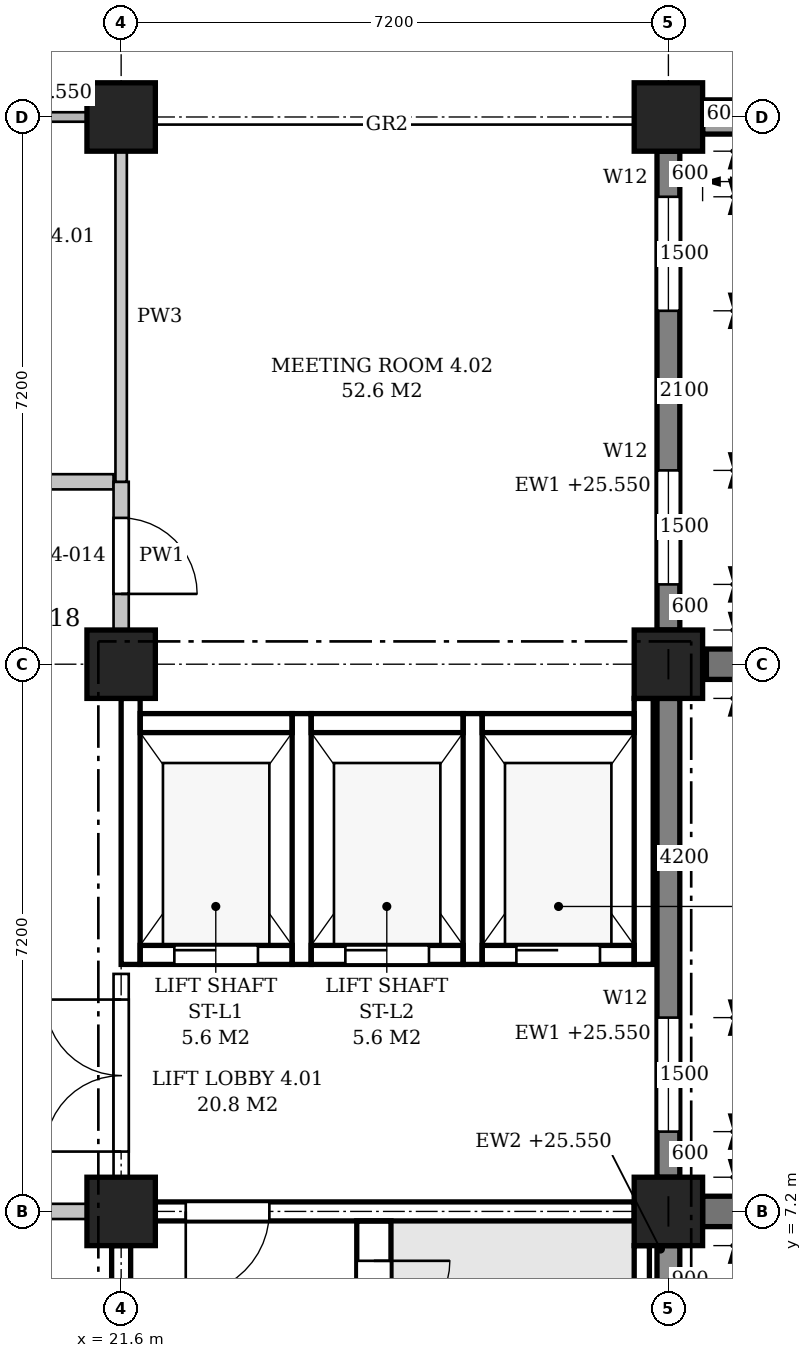
"""IFC4 building model, lengths in metres.
Left out: names, types, materials, properties, quantities, classifications, styles, units other than length and angle.
Written with IfcOpenShell. Run it as: python <this file> out.ifc"""

import sys

from ifc_helpers import new_model, si_unit, direction, frame, frame_2d, origin, origin_2d, place, context, subcontext, project, spatial, polyline, rectangle, outline, extrude, element, fill, save


model = new_model("IFC4")
c1 = context("Model", 3, precision=1e-05, world=origin(), true_north=direction((0.0, 1.0)))
c2 = subcontext(c1, "Body", "Model", "MODEL_VIEW")
j1 = project(units=[si_unit("LENGTHUNIT", "METRE"), si_unit("PLANEANGLEUNIT", "RADIAN")], contexts=[c1])
p1 = place(None, origin())
s1 = spatial("IfcSite", under=j1, at=p1, CompositionType="ELEMENT")
p2 = place(p1, origin())
s2 = spatial("IfcBuilding", under=s1, at=p2, CompositionType="ELEMENT")
p3 = place(p2, frame((0.0, 0.0, 21.6)))
s3 = spatial("IfcBuildingStorey", under=s2, at=p3, CompositionType="ELEMENT", Elevation=21.6)
for number, where, z_axis, x_axis in (
    (1, (21.6, 7.2, 0.0), (0.0, 0.0, 1.0), (1.0, 0.0, 0.0)),
    (2, (21.6, 14.4, 0.0), (0.0, 0.0, 1.0), (1.0, 0.0, 0.0)),
    (3, (21.6, 21.6, 0.0), (0.0, 0.0, 1.0), (1.0, 0.0, 0.0)),
    (4, (28.8, 7.2, 0.0), (0.0, 0.0, 1.0), (1.0, 0.0, 0.0)),
    (5, (28.8, 14.4, 0.0), (0.0, 0.0, 1.0), (1.0, 0.0, 0.0)),
    (6, (28.8, 21.6, 0.0), (0.0, 0.0, 1.0), (1.0, 0.0, 0.0)),
):
    element("IfcColumn", number, at=place(p3, frame(where, z_axis=z_axis, x_axis=x_axis)), inside=s3, PredefinedType="COLUMN", context=c2, shape_type="SweptSolid", body=[
        extrude(rectangle(XDim=0.9, YDim=0.9, at=origin_2d()), origin(), (0.0, 0.0, 1.0), 4.8),
    ])
p4 = place(p3, frame((28.8, 0.45, 0.0), z_axis=(0.0, 0.0, 1.0), x_axis=(0.0, 1.0, 0.0)))
e7 = element("IfcWall", 7, at=p4, inside=s3, PredefinedType="STANDARD", context=c2, shape_type="SweptSolid", body=[
    extrude(rectangle(XDim=6.3, YDim=0.3, at=frame_2d((3.15, 0.0))), origin(), (0.0, 0.0, 1.0), 3.95),
])
p5 = place(p4, frame((0.9, 0.0, 0.9)))
e8 = element("IfcOpeningElement", 8, at=p5, cuts=e7, PredefinedType="OPENING", context=c2, shape_type="SweptSolid", body=[
    extrude(outline(polyline([(0.0, 0.0), (0.9, 0.0), (0.9, 2.05), (0.45, 2.5), (0.0, 2.05), (0.0, 0.0)])), frame((0.0, 0.16, 0.0), z_axis=(0.0, -1.0, 0.0), x_axis=(1.0, 0.0, 0.0)), (0.0, 0.0, 1.0), 0.32),
])
p6 = place(p4, frame((4.5, 0.0, 0.9)))
e9 = element("IfcOpeningElement", 9, at=p6, cuts=e7, PredefinedType="OPENING", context=c2, shape_type="SweptSolid", body=[
    extrude(outline(polyline([(0.0, 0.0), (0.9, 0.0), (0.9, 2.05), (0.45, 2.5), (0.0, 2.05), (0.0, 0.0)])), frame((0.0, 0.16, 0.0), z_axis=(0.0, -1.0, 0.0), x_axis=(1.0, 0.0, 0.0)), (0.0, 0.0, 1.0), 0.32),
])
p7 = place(p3, frame((28.8, 7.65, 0.0), z_axis=(0.0, 0.0, 1.0), x_axis=(0.0, 1.0, 0.0)))
e10 = element("IfcWall", 10, at=p7, inside=s3, PredefinedType="STANDARD", context=c2, shape_type="SweptSolid", body=[
    extrude(rectangle(XDim=6.3, YDim=0.3, at=frame_2d((3.15, 0.0))), origin(), (0.0, 0.0, 1.0), 3.95),
])
p8 = place(p7, frame((0.6, 0.0, 0.9)))
e11 = element("IfcOpeningElement", 11, at=p8, cuts=e10, PredefinedType="OPENING", context=c2, shape_type="SweptSolid", body=[
    extrude(outline(polyline([(0.0, 0.0), (1.5, 0.0), (1.5, 1.75), (0.75, 2.5), (0.0, 1.75), (0.0, 0.0)])), frame((0.0, 0.16, 0.0), z_axis=(0.0, -1.0, 0.0), x_axis=(1.0, 0.0, 0.0)), (0.0, 0.0, 1.0), 0.32),
])
p9 = place(p3, frame((28.8, 14.85, 0.0), z_axis=(0.0, 0.0, 1.0), x_axis=(0.0, 1.0, 0.0)))
e12 = element("IfcWall", 12, at=p9, inside=s3, PredefinedType="STANDARD", context=c2, shape_type="SweptSolid", body=[
    extrude(rectangle(XDim=6.3, YDim=0.3, at=frame_2d((3.15, 0.0))), origin(), (0.0, 0.0, 1.0), 3.95),
])
p10 = place(p9, frame((0.6, 0.0, 0.9)))
e13 = element("IfcOpeningElement", 13, at=p10, cuts=e12, PredefinedType="OPENING", context=c2, shape_type="SweptSolid", body=[
    extrude(outline(polyline([(0.0, 0.0), (1.5, 0.0), (1.5, 1.75), (0.75, 2.5), (0.0, 1.75), (0.0, 0.0)])), frame((0.0, 0.16, 0.0), z_axis=(0.0, -1.0, 0.0), x_axis=(1.0, 0.0, 0.0)), (0.0, 0.0, 1.0), 0.32),
])
p11 = place(p9, frame((4.2, 0.0, 0.9)))
e14 = element("IfcOpeningElement", 14, at=p11, cuts=e12, PredefinedType="OPENING", context=c2, shape_type="SweptSolid", body=[
    extrude(outline(polyline([(0.0, 0.0), (1.5, 0.0), (1.5, 1.75), (0.75, 2.5), (0.0, 1.75), (0.0, 0.0)])), frame((0.0, 0.16, 0.0), z_axis=(0.0, -1.0, 0.0), x_axis=(1.0, 0.0, 0.0)), (0.0, 0.0, 1.0), 0.32),
])
p12 = place(p3, frame((29.25, 21.6, 0.0), z_axis=(0.0, 0.0, 1.0), x_axis=(1.0, 0.0, 0.0)))
e15 = element("IfcWall", 15, at=p12, inside=s3, PredefinedType="STANDARD", context=c2, shape_type="SweptSolid", body=[
    extrude(rectangle(XDim=6.375, YDim=0.45, at=frame_2d((3.188, 0.0))), origin(), (0.0, 0.0, 1.0), 3.5),
])
p13 = place(p12, frame((0.6, 0.0, 0.9)))
e16 = element("IfcOpeningElement", 16, at=p13, cuts=e15, PredefinedType="OPENING", context=c2, shape_type="SweptSolid", body=[
    extrude(outline(polyline([(0.0, 0.0), (1.5, 0.0), (1.5, 1.75), (0.75, 2.5), (0.0, 1.75), (0.0, 0.0)])), frame((0.0, 0.235, 0.0), z_axis=(0.0, -1.0, 0.0), x_axis=(1.0, 0.0, 0.0)), (0.0, 0.0, 1.0), 0.47),
])
p14 = place(p12, frame((4.2, 0.0, 0.9)))
e17 = element("IfcOpeningElement", 17, at=p14, cuts=e15, PredefinedType="OPENING", context=c2, shape_type="SweptSolid", body=[
    extrude(outline(polyline([(0.0, 0.0), (1.5, 0.0), (1.5, 1.75), (0.75, 2.5), (0.0, 1.75), (0.0, 0.0)])), frame((0.0, 0.235, 0.0), z_axis=(0.0, -1.0, 0.0), x_axis=(1.0, 0.0, 0.0)), (0.0, 0.0, 1.0), 0.47),
])
for number, where, z_axis, x_axis in (
    (18, (29.25, 7.2, -0.25), (0.0, 0.0, 1.0), (1.0, 0.0, 0.0)),
    (19, (29.3, 14.4, -0.25), (0.0, 0.0, 1.0), (1.0, 0.0, 0.0)),
):
    element("IfcWall", number, at=place(p3, frame(where, z_axis=z_axis, x_axis=x_axis)), inside=s3, PredefinedType="POLYGONAL", context=c2, shape_type="SweptSolid", body=[
        extrude(outline(polyline([(0.6, 0.0), (0.6, 19.125), (0.55, 19.2), (0.0, 19.2), (0.0, 0.0), (0.6, 0.0)])), frame((0.0, 0.2, 0.0), z_axis=(0.0, -1.0, 0.0), x_axis=(1.0, 0.0, 0.0)), (0.0, 0.0, 1.0), 0.4),
    ])
p15 = place(p3, frame((22.05, 7.2, 0.0), z_axis=(0.0, 0.0, 1.0), x_axis=(1.0, 0.0, 0.0)))
e20 = element("IfcWall", 20, at=p15, inside=s3, PredefinedType="SHEAR", context=c2, shape_type="SweptSolid", body=[
    extrude(rectangle(XDim=6.3, YDim=0.25, at=frame_2d((3.15, 0.0))), origin(), (0.0, 0.0, 1.0), 3.8),
])
p16 = place(p15, frame((0.4, 0.0, 0.0)))
e21 = element("IfcOpeningElement", 21, at=p16, cuts=e20, PredefinedType="OPENING", context=c2, shape_type="SweptSolid", body=[
    extrude(rectangle(XDim=1.1, YDim=2.1, at=frame_2d((0.55, 1.05))), frame((0.0, 0.135, 0.0), z_axis=(0.0, -1.0, 0.0), x_axis=(1.0, 0.0, 0.0)), (0.0, 0.0, 1.0), 0.27),
])
p17 = place(p3, frame((21.6, 0.45, 0.0), z_axis=(0.0, 0.0, 1.0), x_axis=(0.0, 1.0, 0.0)))
e22 = element("IfcWall", 22, at=p17, inside=s3, PredefinedType="SHEAR", context=c2, shape_type="SweptSolid", body=[
    extrude(rectangle(XDim=6.3, YDim=0.25, at=frame_2d((3.15, 0.0))), origin(), (0.0, 0.0, 1.0), 3.8),
])
p18 = place(p3, frame((28.45, 5.85, -0.25), z_axis=(0.0, 0.0, 1.0), x_axis=(0.0, 1.0, 0.0)))
e23 = element("IfcWall", 23, at=p18, inside=s3, PredefinedType="SHEAR", context=c2, shape_type="SweptSolid", body=[
    extrude(rectangle(XDim=0.9, YDim=0.2, at=frame_2d((0.45, 0.0))), origin(), (0.0, 0.0, 1.0), 4.8),
])
p19 = place(p3, frame((24.925, 0.225, 0.0), z_axis=(0.0, 0.0, 1.0), x_axis=(0.0, 1.0, 0.0)))
e24 = element("IfcWall", 24, at=p19, inside=s3, PredefinedType="SHEAR", context=c2, shape_type="SweptSolid", body=[
    extrude(rectangle(XDim=6.85, YDim=0.45, at=frame_2d((3.425, 0.0))), origin(), (0.0, 0.0, 1.0), 4.55),
])
p20 = place(p19, frame((5.325, 0.0, 0.0)))
e25 = element("IfcOpeningElement", 25, at=p20, cuts=e24, PredefinedType="OPENING", context=c2, shape_type="SweptSolid", body=[
    extrude(rectangle(XDim=1.0, YDim=2.1, at=frame_2d((0.5, 1.05))), frame((0.0, 0.235, 0.0), z_axis=(0.0, -1.0, 0.0), x_axis=(1.0, 0.0, 0.0)), (0.0, 0.0, 1.0), 0.47),
])
p21 = place(p3, frame((21.725, 10.45, -0.25), z_axis=(0.0, 0.0, 1.0), x_axis=(0.0, 1.0, 0.0)))
e26 = element("IfcWall", 26, at=p21, inside=s3, PredefinedType="SHEAR", context=c2, shape_type="SweptSolid", body=[
    extrude(rectangle(XDim=3.5, YDim=0.25, at=frame_2d((1.75, 0.0))), origin(), (0.0, 0.0, 1.0), 4.05),
])
for number, where, z_axis, x_axis in (
    (27, (23.975, 10.45, -0.25), (0.0, 0.0, 1.0), (0.0, 1.0, 0.0)),
    (28, (26.225, 10.45, -0.25), (0.0, 0.0, 1.0), (0.0, 1.0, 0.0)),
):
    element("IfcWall", number, at=place(p3, frame(where, z_axis=z_axis, x_axis=x_axis)), inside=s3, PredefinedType="SHEAR", context=c2, shape_type="SweptSolid", body=[
        extrude(rectangle(XDim=3.3, YDim=0.25, at=frame_2d((1.65, 0.0))), origin(), (0.0, 0.0, 1.0), 4.8),
    ])
p22 = place(p3, frame((28.475, 10.45, -0.25), z_axis=(0.0, 0.0, 1.0), x_axis=(0.0, 1.0, 0.0)))
e29 = element("IfcWall", 29, at=p22, inside=s3, PredefinedType="SHEAR", context=c2, shape_type="SweptSolid", body=[
    extrude(rectangle(XDim=3.5, YDim=0.25, at=frame_2d((1.75, 0.0))), origin(), (0.0, 0.0, 1.0), 4.8),
])
p23 = place(p3, frame((21.85, 10.575, -0.25), z_axis=(0.0, 0.0, 1.0), x_axis=(1.0, 0.0, 0.0)))
e30 = element("IfcWall", 30, at=p23, inside=s3, PredefinedType="SHEAR", context=c2, shape_type="SweptSolid", body=[
    extrude(rectangle(XDim=2.0, YDim=0.25, at=frame_2d((1.0, 0.0))), origin(), (0.0, 0.0, 1.0), 4.8),
])
p24 = place(p23, frame((0.45, 0.0, 0.25)))
e31 = element("IfcOpeningElement", 31, at=p24, cuts=e30, PredefinedType="OPENING", context=c2, shape_type="SweptSolid", body=[
    extrude(rectangle(XDim=1.1, YDim=2.1, at=frame_2d((0.55, 1.05))), frame((0.0, 0.135, 0.0), z_axis=(0.0, -1.0, 0.0), x_axis=(1.0, 0.0, 0.0)), (0.0, 0.0, 1.0), 0.27),
])
p25 = place(p3, frame((21.85, 13.625, -0.25), z_axis=(0.0, 0.0, 1.0), x_axis=(1.0, 0.0, 0.0)))
e32 = element("IfcWall", 32, at=p25, inside=s3, PredefinedType="SHEAR", context=c2, shape_type="SweptSolid", body=[
    extrude(rectangle(XDim=2.0, YDim=0.25, at=frame_2d((1.0, 0.0))), origin(), (0.0, 0.0, 1.0), 4.8),
])
p26 = place(p3, frame((24.1, 10.575, -0.25), z_axis=(0.0, 0.0, 1.0), x_axis=(1.0, 0.0, 0.0)))
e33 = element("IfcWall", 33, at=p26, inside=s3, PredefinedType="SHEAR", context=c2, shape_type="SweptSolid", body=[
    extrude(rectangle(XDim=2.0, YDim=0.25, at=frame_2d((1.0, 0.0))), origin(), (0.0, 0.0, 1.0), 4.8),
])
p27 = place(p26, frame((0.45, 0.0, 0.25)))
e34 = element("IfcOpeningElement", 34, at=p27, cuts=e33, PredefinedType="OPENING", context=c2, shape_type="SweptSolid", body=[
    extrude(rectangle(XDim=1.1, YDim=2.1, at=frame_2d((0.55, 1.05))), frame((0.0, 0.135, 0.0), z_axis=(0.0, -1.0, 0.0), x_axis=(1.0, 0.0, 0.0)), (0.0, 0.0, 1.0), 0.27),
])
p28 = place(p3, frame((24.1, 13.625, -0.25), z_axis=(0.0, 0.0, 1.0), x_axis=(1.0, 0.0, 0.0)))
e35 = element("IfcWall", 35, at=p28, inside=s3, PredefinedType="SHEAR", context=c2, shape_type="SweptSolid", body=[
    extrude(rectangle(XDim=2.0, YDim=0.25, at=frame_2d((1.0, 0.0))), origin(), (0.0, 0.0, 1.0), 4.8),
])
p29 = place(p3, frame((26.35, 10.575, -0.25), z_axis=(0.0, 0.0, 1.0), x_axis=(1.0, 0.0, 0.0)))
e36 = element("IfcWall", 36, at=p29, inside=s3, PredefinedType="SHEAR", context=c2, shape_type="SweptSolid", body=[
    extrude(rectangle(XDim=2.0, YDim=0.25, at=frame_2d((1.0, 0.0))), origin(), (0.0, 0.0, 1.0), 4.8),
])
p30 = place(p29, frame((0.45, 0.0, 0.25)))
e37 = element("IfcOpeningElement", 37, at=p30, cuts=e36, PredefinedType="OPENING", context=c2, shape_type="SweptSolid", body=[
    extrude(rectangle(XDim=1.1, YDim=2.1, at=frame_2d((0.55, 1.05))), frame((0.0, 0.135, 0.0), z_axis=(0.0, -1.0, 0.0), x_axis=(1.0, 0.0, 0.0)), (0.0, 0.0, 1.0), 0.27),
])
p31 = place(p3, frame((26.35, 13.625, -0.25), z_axis=(0.0, 0.0, 1.0), x_axis=(1.0, 0.0, 0.0)))
e38 = element("IfcWall", 38, at=p31, inside=s3, PredefinedType="SHEAR", context=c2, shape_type="SweptSolid", body=[
    extrude(rectangle(XDim=2.0, YDim=0.25, at=frame_2d((1.0, 0.0))), origin(), (0.0, 0.0, 1.0), 4.8),
])
p32 = place(p3, frame((14.85, 7.2, 0.0), z_axis=(0.0, 0.0, 1.0), x_axis=(1.0, 0.0, 0.0)))
e39 = element("IfcWall", 39, at=p32, inside=s3, PredefinedType="PARTITIONING", context=c2, shape_type="SweptSolid", body=[
    extrude(rectangle(XDim=6.3, YDim=0.2, at=frame_2d((3.15, 0.0))), origin(), (0.0, 0.0, 1.0), 3.8),
])
p33 = place(p32, frame((4.225, 0.0, 0.0)))
e40 = element("IfcOpeningElement", 40, at=p33, cuts=e39, PredefinedType="OPENING", context=c2, shape_type="SweptSolid", body=[
    extrude(rectangle(XDim=1.0, YDim=2.1, at=frame_2d((0.5, 1.05))), frame((0.0, 0.11, 0.0), z_axis=(0.0, -1.0, 0.0), x_axis=(1.0, 0.0, 0.0)), (0.0, 0.0, 1.0), 0.22),
])
p34 = place(p3, frame((18.1, 16.8, 0.0), z_axis=(0.0, 0.0, 1.0), x_axis=(1.0, 0.0, 0.0)))
e41 = element("IfcWall", 41, at=p34, inside=s3, PredefinedType="PARTITIONING", context=c2, shape_type="SweptSolid", body=[
    extrude(outline(polyline([(0.0, 0.0), (3.4, 0.0), (3.4, 3.8), (3.25, 3.8), (3.25, 4.55), (0.0, 4.55), (0.0, 0.0)])), frame((0.0, 0.1, 0.0), z_axis=(0.0, -1.0, 0.0), x_axis=(1.0, 0.0, 0.0)), (0.0, 0.0, 1.0), 0.2),
])
p35 = place(p34, frame((1.2, 0.0, 0.0)))
e42 = element("IfcOpeningElement", 42, at=p35, cuts=e41, PredefinedType="OPENING", context=c2, shape_type="SweptSolid", body=[
    extrude(rectangle(XDim=1.0, YDim=2.1, at=frame_2d((0.5, 1.05))), frame((0.0, 0.11, 0.0), z_axis=(0.0, -1.0, 0.0), x_axis=(1.0, 0.0, 0.0)), (0.0, 0.0, 1.0), 0.22),
])
p36 = place(p3, frame((21.6, 7.65, 0.0), z_axis=(0.0, 0.0, 1.0), x_axis=(0.0, 1.0, 0.0)))
e43 = element("IfcWall", 43, at=p36, inside=s3, PredefinedType="PARTITIONING", context=c2, shape_type="SweptSolid", body=[
    extrude(rectangle(XDim=2.675, YDim=0.2, at=frame_2d((1.337, 0.0))), origin(), (0.0, 0.0, 1.0), 3.8),
])
p37 = place(p36, frame((0.337, 0.0, 0.0)))
e44 = element("IfcOpeningElement", 44, at=p37, cuts=e43, PredefinedType="OPENING", context=c2, shape_type="SweptSolid", body=[
    extrude(rectangle(XDim=2.0, YDim=2.4, at=frame_2d((1.0, 1.2))), frame((0.0, 0.11, 0.0), z_axis=(0.0, -1.0, 0.0), x_axis=(1.0, 0.0, 0.0)), (0.0, 0.0, 1.0), 0.22),
])
p38 = place(p3, frame((21.6, 14.85, 0.0), z_axis=(0.0, 0.0, 1.0), x_axis=(0.0, 1.0, 0.0)))
e45 = element("IfcWall", 45, at=p38, inside=s3, PredefinedType="PARTITIONING", context=c2, shape_type="SweptSolid", body=[
    extrude(rectangle(XDim=1.95, YDim=0.2, at=frame_2d((0.975, 0.0))), origin(), (0.0, 0.0, 1.0), 3.8),
])
p39 = place(p38, frame((0.475, 0.0, 0.0)))
e46 = element("IfcOpeningElement", 46, at=p39, cuts=e45, PredefinedType="OPENING", context=c2, shape_type="SweptSolid", body=[
    extrude(rectangle(XDim=1.0, YDim=2.1, at=frame_2d((0.5, 1.05))), frame((0.0, 0.11, 0.0), z_axis=(0.0, -1.0, 0.0), x_axis=(1.0, 0.0, 0.0)), (0.0, 0.0, 1.0), 0.22),
])
p40 = place(p3, frame((21.6, 16.8, 0.0), z_axis=(0.0, 0.0, 1.0), x_axis=(0.0, 1.0, 0.0)))
e47 = element("IfcWall", 47, at=p40, inside=s3, PredefinedType="PARTITIONING", context=c2, shape_type="SweptSolid", body=[
    extrude(rectangle(XDim=4.35, YDim=0.15, at=frame_2d((2.175, 0.0))), origin(), (0.0, 0.0, 1.0), 3.8),
])
p41 = place(p8, origin())
e48 = element("IfcWindow", 48, at=p41, inside=s3, PartitioningType="SINGLE_PANEL", PredefinedType="WINDOW", context=c2, shape_type="SweptSolid", body=[
    extrude(outline(polyline([(0.0, 0.0), (1.5, 0.0), (1.5, 1.75), (0.75, 2.5), (0.0, 1.75), (0.0, 0.0)])), frame((0.0, 0.03, 0.0), z_axis=(0.0, -1.0, 0.0), x_axis=(1.0, 0.0, 0.0)), (0.0, 0.0, 1.0), 0.06),
])
fill(e11, e48)
p42 = place(p10, origin())
e49 = element("IfcWindow", 49, at=p42, inside=s3, PartitioningType="SINGLE_PANEL", PredefinedType="WINDOW", context=c2, shape_type="SweptSolid", body=[
    extrude(outline(polyline([(0.0, 0.0), (1.5, 0.0), (1.5, 1.75), (0.75, 2.5), (0.0, 1.75), (0.0, 0.0)])), frame((0.0, 0.03, 0.0), z_axis=(0.0, -1.0, 0.0), x_axis=(1.0, 0.0, 0.0)), (0.0, 0.0, 1.0), 0.06),
])
fill(e13, e49)
p43 = place(p11, origin())
e50 = element("IfcWindow", 50, at=p43, inside=s3, PartitioningType="SINGLE_PANEL", PredefinedType="WINDOW", context=c2, shape_type="SweptSolid", body=[
    extrude(outline(polyline([(0.0, 0.0), (1.5, 0.0), (1.5, 1.75), (0.75, 2.5), (0.0, 1.75), (0.0, 0.0)])), frame((0.0, 0.03, 0.0), z_axis=(0.0, -1.0, 0.0), x_axis=(1.0, 0.0, 0.0)), (0.0, 0.0, 1.0), 0.06),
])
fill(e14, e50)
p44 = place(p20, frame((1.0, 0.0, 0.0), z_axis=(0.0, 0.0, 1.0), x_axis=(-1.0, 0.0, 0.0)))
e51 = element("IfcDoor", 51, at=p44, inside=s3, OperationType="SINGLE_SWING_LEFT", PredefinedType="DOOR", context=c2, shape_type="SweptSolid", body=[
    extrude(rectangle(XDim=1.0, YDim=2.1, at=frame_2d((0.5, 1.05))), frame((0.0, 0.025, 0.0), z_axis=(0.0, -1.0, 0.0), x_axis=(1.0, 0.0, 0.0)), (0.0, 0.0, 1.0), 0.05),
])
fill(e25, e51)
p45 = place(p16, frame((1.1, 0.0, 0.0), z_axis=(0.0, 0.0, 1.0), x_axis=(-1.0, 0.0, 0.0)))
e52 = element("IfcDoor", 52, at=p45, inside=s3, OperationType="SINGLE_SWING_RIGHT", PredefinedType="DOOR", context=c2, shape_type="SweptSolid", body=[
    extrude(rectangle(XDim=1.1, YDim=2.1, at=frame_2d((0.55, 1.05))), frame((0.0, 0.025, 0.0), z_axis=(0.0, -1.0, 0.0), x_axis=(1.0, 0.0, 0.0)), (0.0, 0.0, 1.0), 0.05),
])
fill(e21, e52)
p46 = place(p24, origin())
e53 = element("IfcDoor", 53, at=p46, inside=s3, OperationType="SLIDING_TO_LEFT", PredefinedType="DOOR", context=c2, shape_type="SweptSolid", body=[
    extrude(rectangle(XDim=1.1, YDim=2.1, at=frame_2d((0.55, 1.05))), frame((0.0, 0.025, 0.0), z_axis=(0.0, -1.0, 0.0), x_axis=(1.0, 0.0, 0.0)), (0.0, 0.0, 1.0), 0.05),
])
fill(e31, e53)
p47 = place(p27, origin())
e54 = element("IfcDoor", 54, at=p47, inside=s3, OperationType="SLIDING_TO_LEFT", PredefinedType="DOOR", context=c2, shape_type="SweptSolid", body=[
    extrude(rectangle(XDim=1.1, YDim=2.1, at=frame_2d((0.55, 1.05))), frame((0.0, 0.025, 0.0), z_axis=(0.0, -1.0, 0.0), x_axis=(1.0, 0.0, 0.0)), (0.0, 0.0, 1.0), 0.05),
])
fill(e34, e54)
p48 = place(p30, origin())
e55 = element("IfcDoor", 55, at=p48, inside=s3, OperationType="SLIDING_TO_LEFT", PredefinedType="DOOR", context=c2, shape_type="SweptSolid", body=[
    extrude(rectangle(XDim=1.1, YDim=2.1, at=frame_2d((0.55, 1.05))), frame((0.0, 0.025, 0.0), z_axis=(0.0, -1.0, 0.0), x_axis=(1.0, 0.0, 0.0)), (0.0, 0.0, 1.0), 0.05),
])
fill(e37, e55)
p49 = place(p37, origin())
e56 = element("IfcDoor", 56, at=p49, inside=s3, OperationType="DOUBLE_DOOR_SINGLE_SWING", PredefinedType="DOOR", context=c2, shape_type="SweptSolid", body=[
    extrude(rectangle(XDim=2.0, YDim=2.4, at=frame_2d((1.0, 1.2))), frame((0.0, 0.025, 0.0), z_axis=(0.0, -1.0, 0.0), x_axis=(1.0, 0.0, 0.0)), (0.0, 0.0, 1.0), 0.05),
])
fill(e44, e56)
p50 = place(p39, frame((1.0, 0.0, 0.0), z_axis=(0.0, 0.0, 1.0), x_axis=(-1.0, 0.0, 0.0)))
e57 = element("IfcDoor", 57, at=p50, inside=s3, OperationType="SINGLE_SWING_RIGHT", PredefinedType="DOOR", context=c2, shape_type="SweptSolid", body=[
    extrude(rectangle(XDim=1.0, YDim=2.1, at=frame_2d((0.5, 1.05))), frame((0.0, 0.025, 0.0), z_axis=(0.0, -1.0, 0.0), x_axis=(1.0, 0.0, 0.0)), (0.0, 0.0, 1.0), 0.05),
])
fill(e46, e57)
save(model, sys.argv[1])
